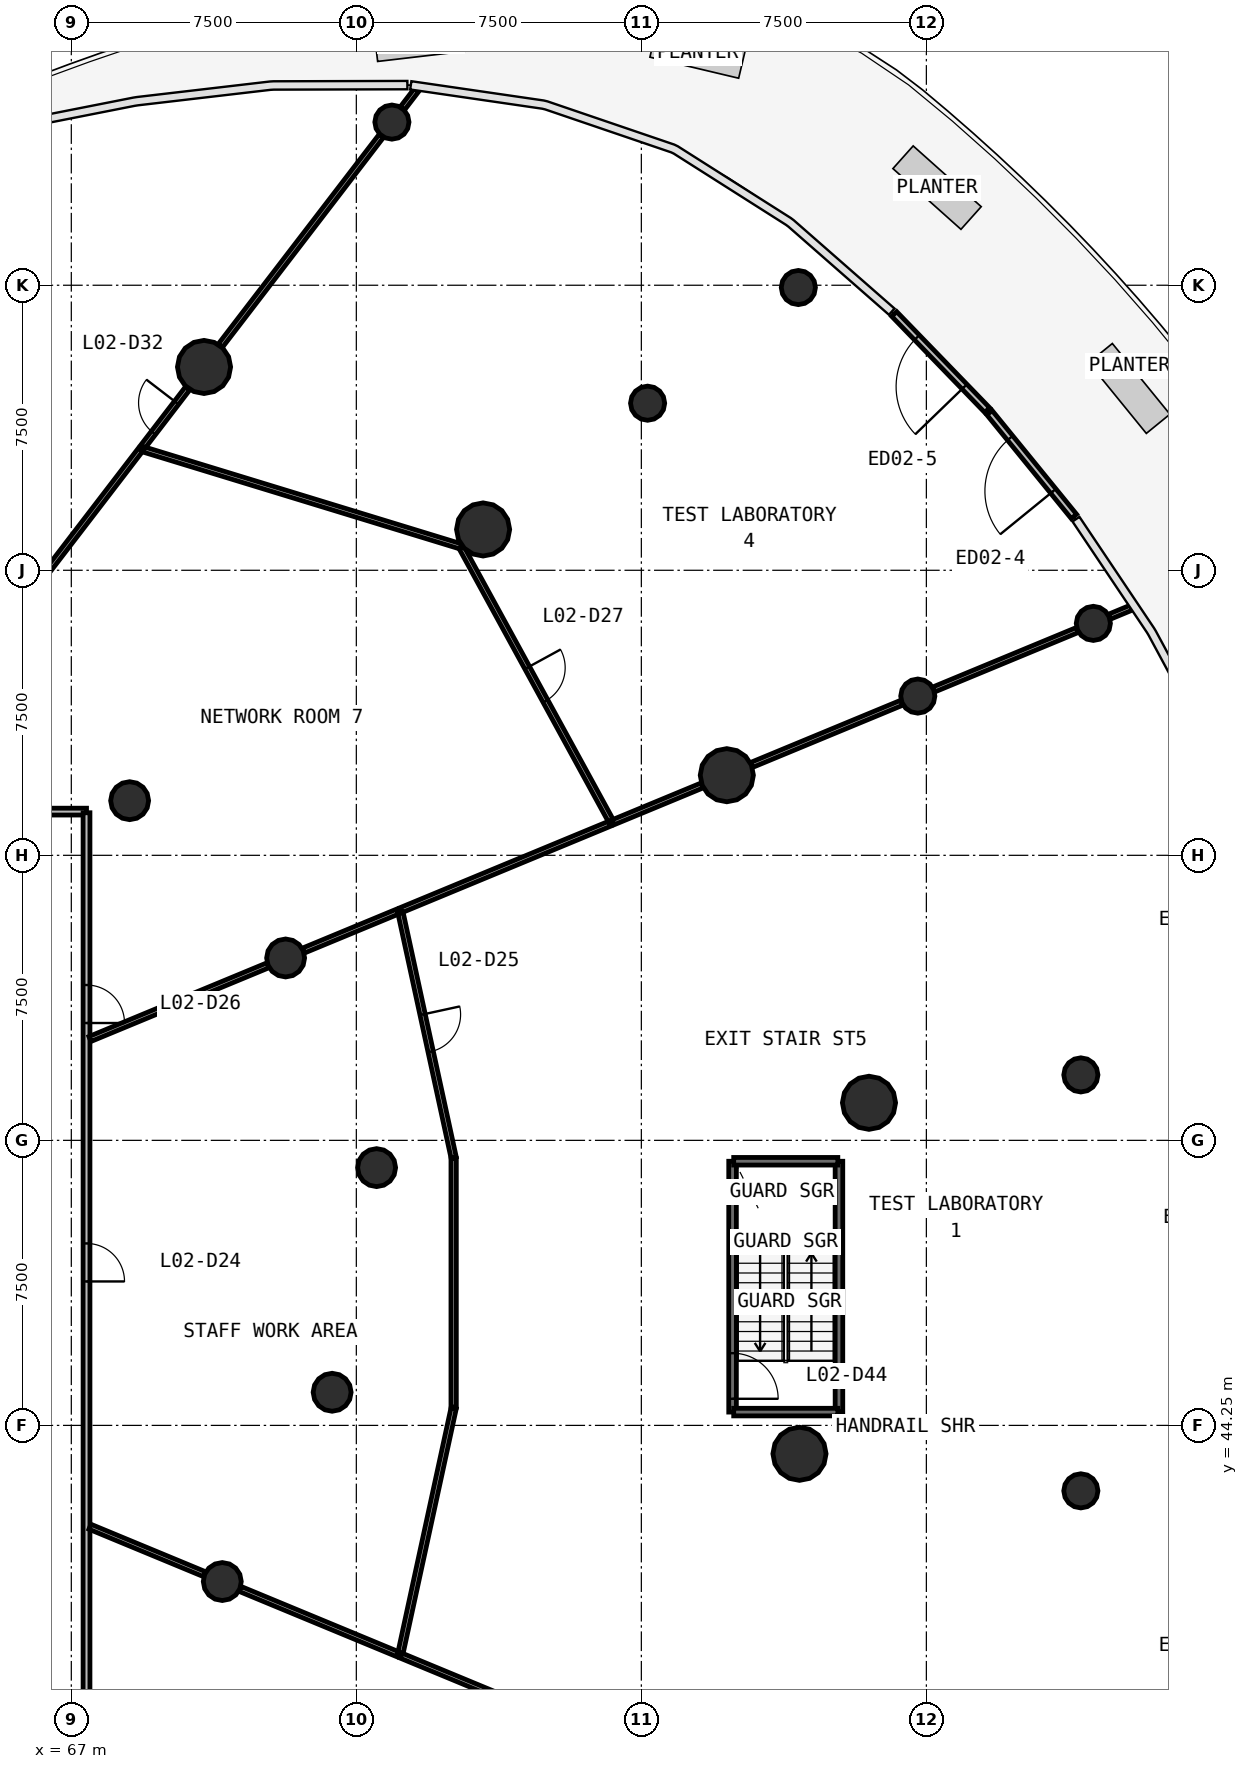
"""IFC4 building model, lengths in metres.
Left out: names, types, materials, properties, quantities, classifications, styles, units other than length and angle.
Written with IfcOpenShell. Run it as: python <this file> out.ifc"""

import sys

from ifc_helpers import new_model, si_unit, direction, frame, frame_2d, origin, origin_2d, place, context, subcontext, project, spatial, rectangle, circle, extrude, source, transform, mapped, element, fill, save


model = new_model("IFC4")
c1 = context("Model", 3, precision=1e-05, world=origin(), true_north=direction((0.0, 1.0)))
c2 = subcontext(c1, "Body", "Model", "MODEL_VIEW")
j1 = project(units=[si_unit("LENGTHUNIT", "METRE"), si_unit("PLANEANGLEUNIT", "RADIAN")], contexts=[c1])
p1 = place(None, origin())
s1 = spatial("IfcSite", under=j1, at=p1, CompositionType="ELEMENT")
p2 = place(p1, origin())
s2 = spatial("IfcBuilding", under=s1, at=p2, CompositionType="ELEMENT")
p3 = place(p2, frame((0.0, 0.0, 9.4)))
s3 = spatial("IfcBuildingStorey", under=s2, at=p3, CompositionType="ELEMENT", Elevation=9.4)
m1 = source(origin(), c2, "Body", "SweptSolid", [
    extrude(circle(Radius=0.7, at=origin_2d()), origin(), (0.0, 0.0, 1.0), 4.4),
])
for number, where, z_axis, x_axis in (
    (1, (87.99, 52.738, 0.0), (0.0, 0.0, 1.0), (1.0, 0.0, 0.0)),
    (2, (84.249, 61.358, 0.0), (0.0, 0.0, 1.0), (1.0, 0.0, 0.0)),
    (3, (77.836, 67.824, 0.0), (0.0, 0.0, 1.0), (1.0, 0.0, 0.0)),
    (4, (70.492, 72.1, 0.0), (0.0, 0.0, 1.0), (1.0, 0.0, 0.0)),
    (5, (86.161, 43.503, 0.0), (0.0, 0.0, 1.0), (1.0, 0.0, 0.0)),
):
    element("IfcColumn", number, at=place(p3, frame(where, z_axis=z_axis, x_axis=x_axis)), inside=s3, PredefinedType="COLUMN", context=c2, shape_type="MappedRepresentation", body=[
        mapped(m1, transform((0.0, 0.0, 0.0), scale=1.0)),
    ])
m2 = source(origin(), c2, "Body", "SweptSolid", [
    extrude(circle(Radius=0.5, at=origin_2d()), origin(), (0.0, 0.0, 1.0), 4.4),
])
for number, where, z_axis, x_axis in (
    (6, (75.034, 51.032, 0.0), (0.0, 0.0, 1.0), (1.0, 0.0, 0.0)),
    (7, (72.639, 56.549, 0.0), (0.0, 0.0, 1.0), (1.0, 0.0, 0.0)),
    (8, (68.535, 60.688, 0.0), (0.0, 0.0, 1.0), (1.0, 0.0, 0.0)),
    (9, (70.972, 40.141, 0.0), (0.0, 0.0, 1.0), (1.0, 0.0, 0.0)),
    (10, (73.863, 45.122, 0.0), (0.0, 0.0, 1.0), (1.0, 0.0, 0.0)),
):
    element("IfcColumn", number, at=place(p3, frame(where, z_axis=z_axis, x_axis=x_axis)), inside=s3, PredefinedType="COLUMN", context=c2, shape_type="MappedRepresentation", body=[
        mapped(m2, transform((0.0, 0.0, 0.0), scale=1.0)),
    ])
m3 = source(origin(), c2, "Body", "SweptSolid", [
    extrude(circle(Radius=0.45, at=origin_2d()), origin(), (0.0, 0.0, 1.0), 3.95),
])
for number, where, z_axis, x_axis in (
    (11, (93.894, 65.353, 0.0), (0.0, 0.0, 1.0), (1.0, 0.0, 0.0)),
    (12, (86.131, 74.19, 0.0), (0.0, 0.0, 1.0), (1.0, 0.0, 0.0)),
    (13, (75.436, 78.543, 0.0), (0.0, 0.0, 1.0), (1.0, 0.0, 0.0)),
):
    element("IfcColumn", number, at=place(p3, frame(where, z_axis=z_axis, x_axis=x_axis)), inside=s3, PredefinedType="COLUMN", context=c2, shape_type="MappedRepresentation", body=[
        mapped(m3, transform((0.0, 0.0, 0.0), scale=1.0)),
    ])
m4 = source(origin(), c2, "Body", "SweptSolid", [
    extrude(circle(Radius=0.45, at=origin_2d()), origin(), (0.0, 0.0, 1.0), 4.4),
])
for number, where, z_axis, x_axis in (
    (14, (93.565, 53.472, 0.0), (0.0, 0.0, 1.0), (1.0, 0.0, 0.0)),
    (15, (89.275, 63.44, 0.0), (0.0, 0.0, 1.0), (1.0, 0.0, 0.0)),
    (16, (82.165, 71.146, 0.0), (0.0, 0.0, 1.0), (1.0, 0.0, 0.0)),
    (17, (93.565, 42.528, 0.0), (0.0, 0.0, 1.0), (1.0, 0.0, 0.0)),
):
    element("IfcColumn", number, at=place(p3, frame(where, z_axis=z_axis, x_axis=x_axis)), inside=s3, PredefinedType="COLUMN", context=c2, shape_type="MappedRepresentation", body=[
        mapped(m4, transform((0.0, 0.0, 0.0), scale=1.0)),
    ])
p4 = place(p3, frame((93.383, 68.167, 0.0), z_axis=(0.0, 0.0, 1.0), x_axis=(-0.631313121726, 0.775528040974, 0.0)))
e18 = element("IfcWall", 18, at=p4, inside=s3, PredefinedType="STANDARD", context=c2, shape_type="SweptSolid", body=[
    extrude(rectangle(XDim=3.52, YDim=0.18, at=frame_2d((1.76, 0.0))), origin(), (0.0, 0.0, 1.0), 3.95),
])
p5 = place(p4, frame((0.86, 0.0, 0.0)))
e19 = element("IfcOpeningElement", 19, at=p5, cuts=e18, PredefinedType="OPENING", context=c2, shape_type="SweptSolid", body=[
    extrude(rectangle(XDim=1.8, YDim=2.4, at=frame_2d((0.9, 1.2))), frame((0.0, 0.1, 0.0), z_axis=(0.0, -1.0, 0.0), x_axis=(1.0, 0.0, 0.0)), (0.0, 0.0, 1.0), 0.2),
])
p6 = place(p3, frame((91.102, 70.964, 0.0), z_axis=(0.0, 0.0, 1.0), x_axis=(-0.695392540052, 0.718630096253, 0.0)))
e20 = element("IfcWall", 20, at=p6, inside=s3, PredefinedType="STANDARD", context=c2, shape_type="SweptSolid", body=[
    extrude(rectangle(XDim=3.52, YDim=0.18, at=frame_2d((1.76, 0.0))), origin(), (0.0, 0.0, 1.0), 3.95),
])
p7 = place(p6, frame((0.86, 0.0, 0.0)))
e21 = element("IfcOpeningElement", 21, at=p7, cuts=e20, PredefinedType="OPENING", context=c2, shape_type="SweptSolid", body=[
    extrude(rectangle(XDim=1.8, YDim=2.4, at=frame_2d((0.9, 1.2))), frame((0.0, 0.1, 0.0), z_axis=(0.0, -1.0, 0.0), x_axis=(1.0, 0.0, 0.0)), (0.0, 0.0, 1.0), 0.2),
])
p8 = place(p3, frame((87.2, 44.6, 0.0), z_axis=(0.0, 0.0, 1.0), x_axis=(0.0, 1.0, 0.0)))
e22 = element("IfcWall", 22, at=p8, inside=s3, PredefinedType="SOLIDWALL", context=c2, shape_type="SweptSolid", body=[
    extrude(rectangle(XDim=6.6, YDim=0.2, at=frame_2d((3.3, 0.0))), origin(), (0.0, 0.0, 1.0), 3.95),
])
p9 = place(p3, frame((84.4, 51.2, 0.0), z_axis=(0.0, 0.0, 1.0), x_axis=(0.0, -1.0, 0.0)))
e23 = element("IfcWall", 23, at=p9, inside=s3, PredefinedType="SOLIDWALL", context=c2, shape_type="SweptSolid", body=[
    extrude(rectangle(XDim=6.6, YDim=0.2, at=frame_2d((3.3, 0.0))), origin(), (0.0, 0.0, 1.0), 3.95),
])
p10 = place(p9, frame((5.05, 0.0, 0.0)))
e24 = element("IfcOpeningElement", 24, at=p10, cuts=e23, PredefinedType="OPENING", context=c2, shape_type="SweptSolid", body=[
    extrude(rectangle(XDim=1.2, YDim=2.1, at=frame_2d((0.6, 1.05))), frame((0.0, 0.11, 0.0), z_axis=(0.0, -1.0, 0.0), x_axis=(1.0, 0.0, 0.0)), (0.0, 0.0, 1.0), 0.22),
])
for number, where, z_axis, x_axis in (
    (25, (84.43, 44.6, 0.0), (0.0, 0.0, 1.0), (1.0, 0.0, 0.0)),
    (26, (87.17, 51.2, 0.0), (0.0, 0.0, 1.0), (-1.0, 0.0, 0.0)),
):
    element("IfcWall", number, at=place(p3, frame(where, z_axis=z_axis, x_axis=x_axis)), inside=s3, PredefinedType="SOLIDWALL", context=c2, shape_type="SweptSolid", body=[
        extrude(rectangle(XDim=2.74, YDim=0.2, at=frame_2d((1.37, 0.0))), origin(), (0.0, 0.0, 1.0), 3.95),
    ])
p11 = place(p3, frame((36.6, 60.4, 0.0), z_axis=(0.0, 0.0, 1.0), x_axis=(1.0, 0.0, 0.0)))
e27 = element("IfcWall", 27, at=p11, inside=s3, PredefinedType="PARTITIONING", context=c2, shape_type="SweptSolid", body=[
    extrude(rectangle(XDim=30.8, YDim=0.18, at=frame_2d((15.4, 0.0))), origin(), (0.0, 0.0, 1.0), 3.15),
])
p12 = place(p11, frame((22.25, 0.0, 0.0)))
e28 = element("IfcOpeningElement", 28, at=p12, cuts=e27, PredefinedType="OPENING", context=c2, shape_type="SweptSolid", body=[
    extrude(rectangle(XDim=0.9, YDim=2.1, at=frame_2d((0.45, 1.05))), frame((0.0, 0.1, 0.0), z_axis=(0.0, -1.0, 0.0), x_axis=(1.0, 0.0, 0.0)), (0.0, 0.0, 1.0), 0.2),
])
p13 = place(p11, frame((19.65, 0.0, 0.0)))
e29 = element("IfcOpeningElement", 29, at=p13, cuts=e27, PredefinedType="OPENING", context=c2, shape_type="SweptSolid", body=[
    extrude(rectangle(XDim=0.9, YDim=2.1, at=frame_2d((0.45, 1.05))), frame((0.0, 0.1, 0.0), z_axis=(0.0, -1.0, 0.0), x_axis=(1.0, 0.0, 0.0)), (0.0, 0.0, 1.0), 0.2),
])
p14 = place(p11, frame((17.25, 0.0, 0.0)))
e30 = element("IfcOpeningElement", 30, at=p14, cuts=e27, PredefinedType="OPENING", context=c2, shape_type="SweptSolid", body=[
    extrude(rectangle(XDim=0.9, YDim=2.1, at=frame_2d((0.45, 1.05))), frame((0.0, 0.1, 0.0), z_axis=(0.0, -1.0, 0.0), x_axis=(1.0, 0.0, 0.0)), (0.0, 0.0, 1.0), 0.2),
])
p15 = place(p11, frame((14.95, 0.0, 0.0)))
e31 = element("IfcOpeningElement", 31, at=p15, cuts=e27, PredefinedType="OPENING", context=c2, shape_type="SweptSolid", body=[
    extrude(rectangle(XDim=1.0, YDim=2.1, at=frame_2d((0.5, 1.05))), frame((0.0, 0.1, 0.0), z_axis=(0.0, -1.0, 0.0), x_axis=(1.0, 0.0, 0.0)), (0.0, 0.0, 1.0), 0.2),
])
p16 = place(p3, frame((67.4, 60.37, 0.0), z_axis=(0.0, 0.0, 1.0), x_axis=(0.0, -1.0, 0.0)))
e32 = element("IfcWall", 32, at=p16, inside=s3, PredefinedType="PARTITIONING", context=c2, shape_type="SweptSolid", body=[
    extrude(rectangle(XDim=23.583, YDim=0.18, at=frame_2d((11.791, 0.0))), origin(), (0.0, 0.0, 1.0), 3.15),
])
p17 = place(p16, frame((11.333, 0.0, 0.0)))
e33 = element("IfcOpeningElement", 33, at=p17, cuts=e32, PredefinedType="OPENING", context=c2, shape_type="SweptSolid", body=[
    extrude(rectangle(XDim=1.0, YDim=2.1, at=frame_2d((0.5, 1.05))), frame((0.0, 0.1, 0.0), z_axis=(0.0, -1.0, 0.0), x_axis=(1.0, 0.0, 0.0)), (0.0, 0.0, 1.0), 0.2),
])
p18 = place(p16, frame((4.532, 0.0, 0.0)))
e34 = element("IfcOpeningElement", 34, at=p18, cuts=e32, PredefinedType="OPENING", context=c2, shape_type="SweptSolid", body=[
    extrude(rectangle(XDim=1.0, YDim=2.1, at=frame_2d((0.5, 1.05))), frame((0.0, 0.1, 0.0), z_axis=(0.0, -1.0, 0.0), x_axis=(1.0, 0.0, 0.0)), (0.0, 0.0, 1.0), 0.2),
])
p19 = place(p3, frame((77.252, 67.376, 0.0), z_axis=(0.0, 0.0, 1.0), x_axis=(-0.956290134039, 0.292419526604, 0.0)))
e35 = element("IfcWall", 35, at=p19, inside=s3, PredefinedType="PARTITIONING", context=c2, shape_type="SweptSolid", body=[
    extrude(rectangle(XDim=8.795, YDim=0.14, at=frame_2d((4.397, 0.0))), origin(), (0.0, 0.0, 1.0), 3.15),
])
p20 = place(p3, frame((77.266, 67.35, 0.0), z_axis=(0.0, 0.0, 1.0), x_axis=(0.479691047334, -0.877437461651, 0.0)))
e36 = element("IfcWall", 36, at=p20, inside=s3, PredefinedType="PARTITIONING", context=c2, shape_type="SweptSolid", body=[
    extrude(rectangle(XDim=8.256, YDim=0.14, at=frame_2d((4.128, 0.0))), origin(), (0.0, 0.0, 1.0), 3.15),
])
p21 = place(p20, frame((3.606, 0.0, 0.0)))
e37 = element("IfcOpeningElement", 37, at=p21, cuts=e36, PredefinedType="OPENING", context=c2, shape_type="SweptSolid", body=[
    extrude(rectangle(XDim=1.0, YDim=2.1, at=frame_2d((0.5, 1.05))), frame((0.0, 0.08, 0.0), z_axis=(0.0, -1.0, 0.0), x_axis=(1.0, 0.0, 0.0)), (0.0, 0.0, 1.0), 0.16),
])
p22 = place(p3, frame((70.921, 72.658, 0.0), z_axis=(0.0, 0.0, 1.0), x_axis=(0.608788506125, 0.793332562555, 0.0)))
e38 = element("IfcWall", 38, at=p22, inside=s3, PredefinedType="PARTITIONING", context=c2, shape_type="SweptSolid", body=[
    extrude(rectangle(XDim=6.963, YDim=0.14, at=frame_2d((3.481, 0.0))), origin(), (0.0, 0.0, 1.0), 3.15),
])
p23 = place(p3, frame((75.65, 57.796, 0.0), z_axis=(0.0, 0.0, 1.0), x_axis=(0.212219247402, -0.977222078666, 0.0)))
e39 = element("IfcWall", 39, at=p23, inside=s3, PredefinedType="PARTITIONING", context=c2, shape_type="SweptSolid", body=[
    extrude(rectangle(XDim=6.648, YDim=0.14, at=frame_2d((3.324, 0.0))), origin(), (0.0, 0.0, 1.0), 3.15),
])
p24 = place(p23, frame((2.798, 0.0, 0.0)))
e40 = element("IfcOpeningElement", 40, at=p24, cuts=e39, PredefinedType="OPENING", context=c2, shape_type="SweptSolid", body=[
    extrude(rectangle(XDim=1.0, YDim=2.1, at=frame_2d((0.5, 1.05))), frame((0.0, 0.08, 0.0), z_axis=(0.0, -1.0, 0.0), x_axis=(1.0, 0.0, 0.0)), (0.0, 0.0, 1.0), 0.16),
])
p25 = place(p3, frame((75.65, 38.204, 0.0), z_axis=(0.0, 0.0, 1.0), x_axis=(0.212219247402, 0.977222078666, 0.0)))
e41 = element("IfcWall", 41, at=p25, inside=s3, PredefinedType="PARTITIONING", context=c2, shape_type="SweptSolid", body=[
    extrude(rectangle(XDim=6.648, YDim=0.14, at=frame_2d((3.324, 0.0))), origin(), (0.0, 0.0, 1.0), 3.15),
])
p26 = place(p3, frame((77.061, 44.731, 0.0), z_axis=(0.0, 0.0, 1.0), x_axis=(0.0, 1.0, 0.0)))
e42 = element("IfcWall", 42, at=p26, inside=s3, PredefinedType="PARTITIONING", context=c2, shape_type="SweptSolid", body=[
    extrude(rectangle(XDim=6.539, YDim=0.14, at=frame_2d((3.269, 0.0))), origin(), (0.0, 0.0, 1.0), 3.15),
])
p27 = place(p3, frame((75.677, 57.808, 0.0), z_axis=(0.0, 0.0, 1.0), x_axis=(0.923888996988, 0.382660582297, 0.0)))
e43 = element("IfcWall", 43, at=p27, inside=s3, PredefinedType="PARTITIONING", context=c2, shape_type="SweptSolid", body=[
    extrude(rectangle(XDim=5.935, YDim=0.14, at=frame_2d((2.968, 0.0))), origin(), (0.0, 0.0, 1.0), 3.15),
])
p28 = place(p3, frame((75.677, 38.192, 0.0), z_axis=(0.0, 0.0, 1.0), x_axis=(0.923874610175, -0.38269531572, 0.0)))
e44 = element("IfcWall", 44, at=p28, inside=s3, PredefinedType="PARTITIONING", context=c2, shape_type="SweptSolid", body=[
    extrude(rectangle(XDim=5.754, YDim=0.14, at=frame_2d((2.877, 0.0))), origin(), (0.0, 0.0, 1.0), 3.15),
])
p29 = place(p3, frame((67.49, 54.416, 0.0), z_axis=(0.0, 0.0, 1.0), x_axis=(0.923890025086, 0.382658100067, 0.0)))
e45 = element("IfcWall", 45, at=p29, inside=s3, PredefinedType="PARTITIONING", context=c2, shape_type="SweptSolid", body=[
    extrude(rectangle(XDim=5.068, YDim=0.14, at=frame_2d((2.534, 0.0))), origin(), (0.0, 0.0, 1.0), 3.15),
])
p30 = place(p3, frame((65.905, 66.121, 0.0), z_axis=(0.0, 0.0, 1.0), x_axis=(0.608747971689, 0.793363666274, 0.0)))
e46 = element("IfcWall", 46, at=p30, inside=s3, PredefinedType="PARTITIONING", context=c2, shape_type="SweptSolid", body=[
    extrude(rectangle(XDim=4.794, YDim=0.14, at=frame_2d((2.397, 0.0))), origin(), (0.0, 0.0, 1.0), 3.15),
])
p31 = place(p3, frame((71.439, 39.948, 0.0), z_axis=(0.0, 0.0, 1.0), x_axis=(0.923881526718, -0.382678617888, 0.0)))
e47 = element("IfcWall", 47, at=p31, inside=s3, PredefinedType="PARTITIONING", context=c2, shape_type="SweptSolid", body=[
    extrude(rectangle(XDim=4.486, YDim=0.14, at=frame_2d((2.243, 0.0))), origin(), (0.0, 0.0, 1.0), 3.15),
])
p32 = place(p3, frame((84.9, 61.628, 0.0), z_axis=(0.0, 0.0, 1.0), x_axis=(0.923871522787, 0.382702768979, 0.0)))
e48 = element("IfcWall", 48, at=p32, inside=s3, PredefinedType="PARTITIONING", context=c2, shape_type="SweptSolid", body=[
    extrude(rectangle(XDim=4.28, YDim=0.14, at=frame_2d((2.14, 0.0))), origin(), (0.0, 0.0, 1.0), 3.15),
])
p33 = place(p3, frame((89.695, 63.614, 0.0), z_axis=(0.0, 0.0, 1.0), x_axis=(0.92386621601, 0.382715579661, 0.0)))
e49 = element("IfcWall", 49, at=p33, inside=s3, PredefinedType="PARTITIONING", context=c2, shape_type="SweptSolid", body=[
    extrude(rectangle(XDim=4.09, YDim=0.14, at=frame_2d((2.045, 0.0))), origin(), (0.0, 0.0, 1.0), 3.15),
])
p34 = place(p3, frame((67.49, 41.584, 0.0), z_axis=(0.0, 0.0, 1.0), x_axis=(0.923911109142, -0.382607190737, 0.0)))
e50 = element("IfcWall", 50, at=p34, inside=s3, PredefinedType="PARTITIONING", context=c2, shape_type="SweptSolid", body=[
    extrude(rectangle(XDim=3.264, YDim=0.14, at=frame_2d((1.632, 0.0))), origin(), (0.0, 0.0, 1.0), 3.15),
])
p35 = place(p3, frame((73.106, 56.742, 0.0), z_axis=(0.0, 0.0, 1.0), x_axis=(0.923855963606, 0.38274032778, 0.0)))
e51 = element("IfcWall", 51, at=p35, inside=s3, PredefinedType="PARTITIONING", context=c2, shape_type="SweptSolid", body=[
    extrude(rectangle(XDim=2.682, YDim=0.14, at=frame_2d((1.341, 0.0))), origin(), (0.0, 0.0, 1.0), 3.15),
])
p36 = place(p3, frame((81.254, 60.117, 0.0), z_axis=(0.0, 0.0, 1.0), x_axis=(0.923860824757, 0.382728593756, 0.0)))
e52 = element("IfcWall", 52, at=p36, inside=s3, PredefinedType="PARTITIONING", context=c2, shape_type="SweptSolid", body=[
    extrude(rectangle(XDim=2.537, YDim=0.14, at=frame_2d((1.269, 0.0))), origin(), (0.0, 0.0, 1.0), 3.15),
])
p37 = place(p3, frame((68.887, 70.007, 0.0), z_axis=(0.0, 0.0, 1.0), x_axis=(0.608733755036, 0.79337457451, 0.0)))
e53 = element("IfcWall", 53, at=p37, inside=s3, PredefinedType="PARTITIONING", context=c2, shape_type="SweptSolid", body=[
    extrude(rectangle(XDim=1.933, YDim=0.14, at=frame_2d((0.967, 0.0))), origin(), (0.0, 0.0, 1.0), 3.15),
])
p38 = place(p37, frame((0.45, 0.0, 0.0)))
e54 = element("IfcOpeningElement", 54, at=p38, cuts=e53, PredefinedType="OPENING", context=c2, shape_type="SweptSolid", body=[
    extrude(rectangle(XDim=1.0, YDim=2.1, at=frame_2d((0.5, 1.05))), frame((0.0, 0.08, 0.0), z_axis=(0.0, -1.0, 0.0), x_axis=(1.0, 0.0, 0.0)), (0.0, 0.0, 1.0), 0.16),
])
p39 = place(p3, frame((94.314, 65.527, 0.0), z_axis=(0.0, 0.0, 1.0), x_axis=(0.923861804277, 0.382726229306, 0.0)))
e55 = element("IfcWall", 55, at=p39, inside=s3, PredefinedType="PARTITIONING", context=c2, shape_type="SweptSolid", body=[
    extrude(rectangle(XDim=0.634, YDim=0.14, at=frame_2d((0.317, 0.0))), origin(), (0.0, 0.0, 1.0), 3.15),
])
p40 = place(p3, frame((75.713, 78.903, 0.0), z_axis=(0.0, 0.0, 1.0), x_axis=(0.608865317956, 0.79327361269, 0.0)))
e56 = element("IfcWall", 56, at=p40, inside=s3, PredefinedType="PARTITIONING", context=c2, shape_type="SweptSolid", body=[
    extrude(rectangle(XDim=0.614, YDim=0.14, at=frame_2d((0.307, 0.0))), origin(), (0.0, 0.0, 1.0), 3.15),
])
m5 = source(origin(), c2, "Body", "SweptSolid", [
    extrude(rectangle(XDim=1.8, YDim=2.4, at=frame_2d((0.9, 1.2))), frame((0.0, 0.025, 0.0), z_axis=(0.0, -1.0, 0.0), x_axis=(1.0, 0.0, 0.0)), (0.0, 0.0, 1.0), 0.05),
])
p41 = place(p5, origin())
e57 = element("IfcDoor", 57, at=p41, inside=s3, OperationType="DOUBLE_DOOR_SINGLE_SWING", PredefinedType="DOOR", context=c2, shape_type="MappedRepresentation", body=[
    mapped(m5, transform((0.0, 0.0, 0.0), scale=1.0)),
])
fill(e19, e57)
p42 = place(p7, origin())
e58 = element("IfcDoor", 58, at=p42, inside=s3, OperationType="DOUBLE_DOOR_SINGLE_SWING", PredefinedType="DOOR", context=c2, shape_type="MappedRepresentation", body=[
    mapped(m5, transform((0.0, 0.0, 0.0), scale=1.0)),
])
fill(e21, e58)
m6 = source(origin(), c2, "Body", "SweptSolid", [
    extrude(rectangle(XDim=1.0, YDim=2.1, at=frame_2d((0.5, 1.05))), frame((0.0, 0.025, 0.0), z_axis=(0.0, -1.0, 0.0), x_axis=(1.0, 0.0, 0.0)), (0.0, 0.0, 1.0), 0.05),
])
p43 = place(p17, origin())
e59 = element("IfcDoor", 59, at=p43, inside=s3, OperationType="SINGLE_SWING_RIGHT", PredefinedType="DOOR", context=c2, shape_type="MappedRepresentation", body=[
    mapped(m6, transform((0.0, 0.0, 0.0), scale=1.0)),
])
fill(e33, e59)
p44 = place(p24, origin())
e60 = element("IfcDoor", 60, at=p44, inside=s3, OperationType="SINGLE_SWING_LEFT", PredefinedType="DOOR", context=c2, shape_type="MappedRepresentation", body=[
    mapped(m6, transform((0.0, 0.0, 0.0), scale=1.0)),
])
fill(e40, e60)
p45 = place(p18, origin())
e61 = element("IfcDoor", 61, at=p45, inside=s3, OperationType="SINGLE_SWING_RIGHT", PredefinedType="DOOR", context=c2, shape_type="MappedRepresentation", body=[
    mapped(m6, transform((0.0, 0.0, 0.0), scale=1.0)),
])
fill(e34, e61)
p46 = place(p21, origin())
e62 = element("IfcDoor", 62, at=p46, inside=s3, OperationType="SINGLE_SWING_LEFT", PredefinedType="DOOR", context=c2, shape_type="MappedRepresentation", body=[
    mapped(m6, transform((0.0, 0.0, 0.0), scale=1.0)),
])
fill(e37, e62)
p47 = place(p38, origin())
e63 = element("IfcDoor", 63, at=p47, inside=s3, OperationType="SINGLE_SWING_RIGHT", PredefinedType="DOOR", context=c2, shape_type="MappedRepresentation", body=[
    mapped(m6, transform((0.0, 0.0, 0.0), scale=1.0)),
])
fill(e54, e63)
m7 = source(origin(), c2, "Body", "SweptSolid", [
    extrude(rectangle(XDim=1.2, YDim=2.1, at=frame_2d((0.6, 1.05))), frame((0.0, 0.025, 0.0), z_axis=(0.0, -1.0, 0.0), x_axis=(1.0, 0.0, 0.0)), (0.0, 0.0, 1.0), 0.05),
])
p48 = place(p10, origin())
e64 = element("IfcDoor", 64, at=p48, inside=s3, OperationType="SINGLE_SWING_RIGHT", PredefinedType="DOOR", context=c2, shape_type="MappedRepresentation", body=[
    mapped(m7, transform((0.0, 0.0, 0.0), scale=1.0)),
])
fill(e24, e64)
save(model, sys.argv[1])
